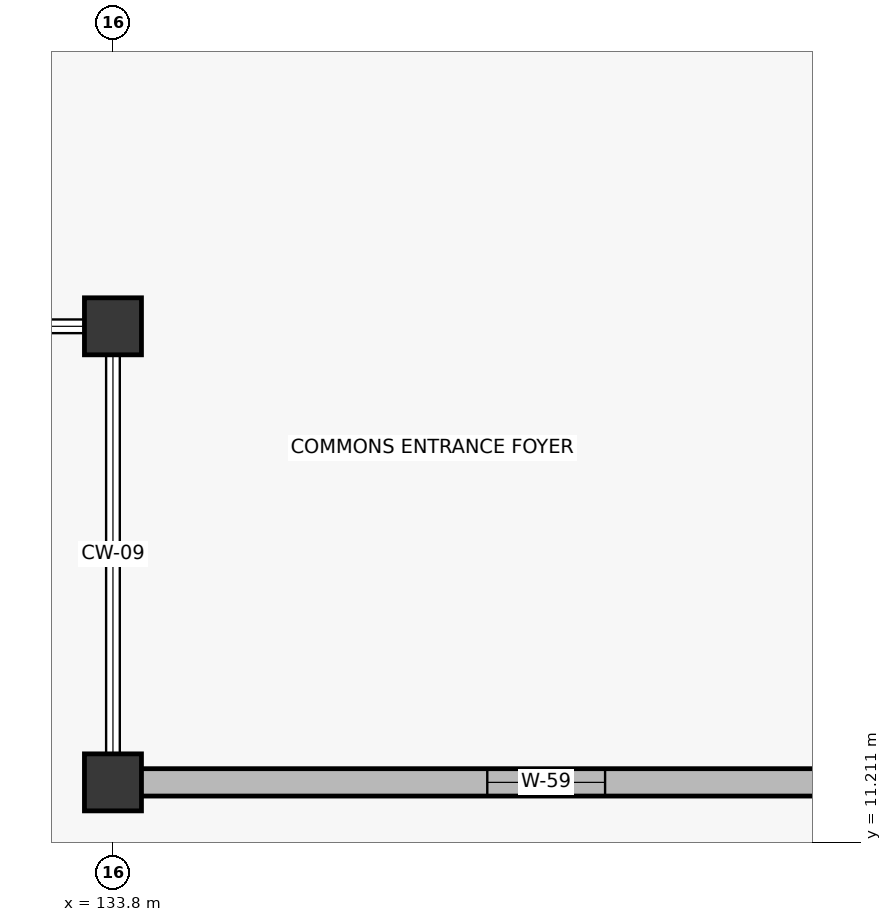
"""IFC4 building model, lengths in metres.
Left out: names, types, materials, properties, quantities, classifications, styles, units other than length and angle.
Written with IfcOpenShell. Run it as: python <this file> out.ifc"""

import sys

from ifc_helpers import new_model, si_unit, direction, frame, frame_2d, origin, origin_2d, place, context, subcontext, project, spatial, rectangle, extrude, element, fill, save


model = new_model("IFC4")
c1 = context("Model", 3, precision=1e-05, world=origin(), true_north=direction((0.0, 1.0)))
c2 = subcontext(c1, "Body", "Model", "MODEL_VIEW")
j1 = project(units=[si_unit("LENGTHUNIT", "METRE"), si_unit("PLANEANGLEUNIT", "RADIAN")], contexts=[c1])
p1 = place(None, origin())
s1 = spatial("IfcSite", under=j1, at=p1, CompositionType="ELEMENT")
p2 = place(p1, origin())
s2 = spatial("IfcBuilding", under=s1, at=p2, CompositionType="ELEMENT")
p3 = place(p2, origin())
s3 = spatial("IfcBuildingStorey", under=s2, at=p3, CompositionType="ELEMENT", Elevation=0.0)
for number, where, z_axis, x_axis in (
    (1, (133.8, 18.0, 0.0), (0.0, 0.0, 1.0), (1.0, 0.0, 0.0)),
    (2, (133.8, 12.0, 0.0), (0.0, 0.0, 1.0), (1.0, 0.0, 0.0)),
):
    element("IfcColumn", number, at=place(p3, frame(where, z_axis=z_axis, x_axis=x_axis)), inside=s3, PredefinedType="COLUMN", context=c2, shape_type="SweptSolid", body=[
        extrude(rectangle(XDim=0.75, YDim=0.75, at=origin_2d()), origin(), (0.0, 0.0, 1.0), 5.4),
    ])
p4 = place(p3, frame((134.165, 12.0, 0.0), z_axis=(0.0, 0.0, 1.0), x_axis=(1.0, 0.0, 0.0)))
e3 = element("IfcWall", 3, at=p4, inside=s3, PredefinedType="SOLIDWALL", context=c2, shape_type="SweptSolid", body=[
    extrude(rectangle(XDim=10.67, YDim=0.36, at=frame_2d((5.335, 0.0))), origin(), (0.0, 0.0, 1.0), 4.315),
])
p5 = place(p4, frame((4.56, 0.0, 0.85)))
e4 = element("IfcOpeningElement", 4, at=p5, cuts=e3, PredefinedType="OPENING", context=c2, shape_type="SweptSolid", body=[
    extrude(rectangle(XDim=1.55, YDim=1.55, at=frame_2d((0.775, 0.775))), frame((0.0, 0.19, 0.0), z_axis=(0.0, -1.0, 0.0), x_axis=(1.0, 0.0, 0.0)), (0.0, 0.0, 1.0), 0.38),
])
p6 = place(p5, frame((1.55, 0.0, 0.0), z_axis=(0.0, 0.0, 1.0), x_axis=(-1.0, 0.0, 0.0)))
e5 = element("IfcWindow", 5, at=p6, inside=s3, PartitioningType="DOUBLE_PANEL_VERTICAL", PredefinedType="WINDOW", context=c2, shape_type="SweptSolid", body=[
    extrude(rectangle(XDim=1.55, YDim=1.55, at=frame_2d((0.775, 0.775))), frame((0.0, 0.03, 0.0), z_axis=(0.0, -1.0, 0.0), x_axis=(1.0, 0.0, 0.0)), (0.0, 0.0, 1.0), 0.06),
])
fill(e4, e5)
save(model, sys.argv[1])
